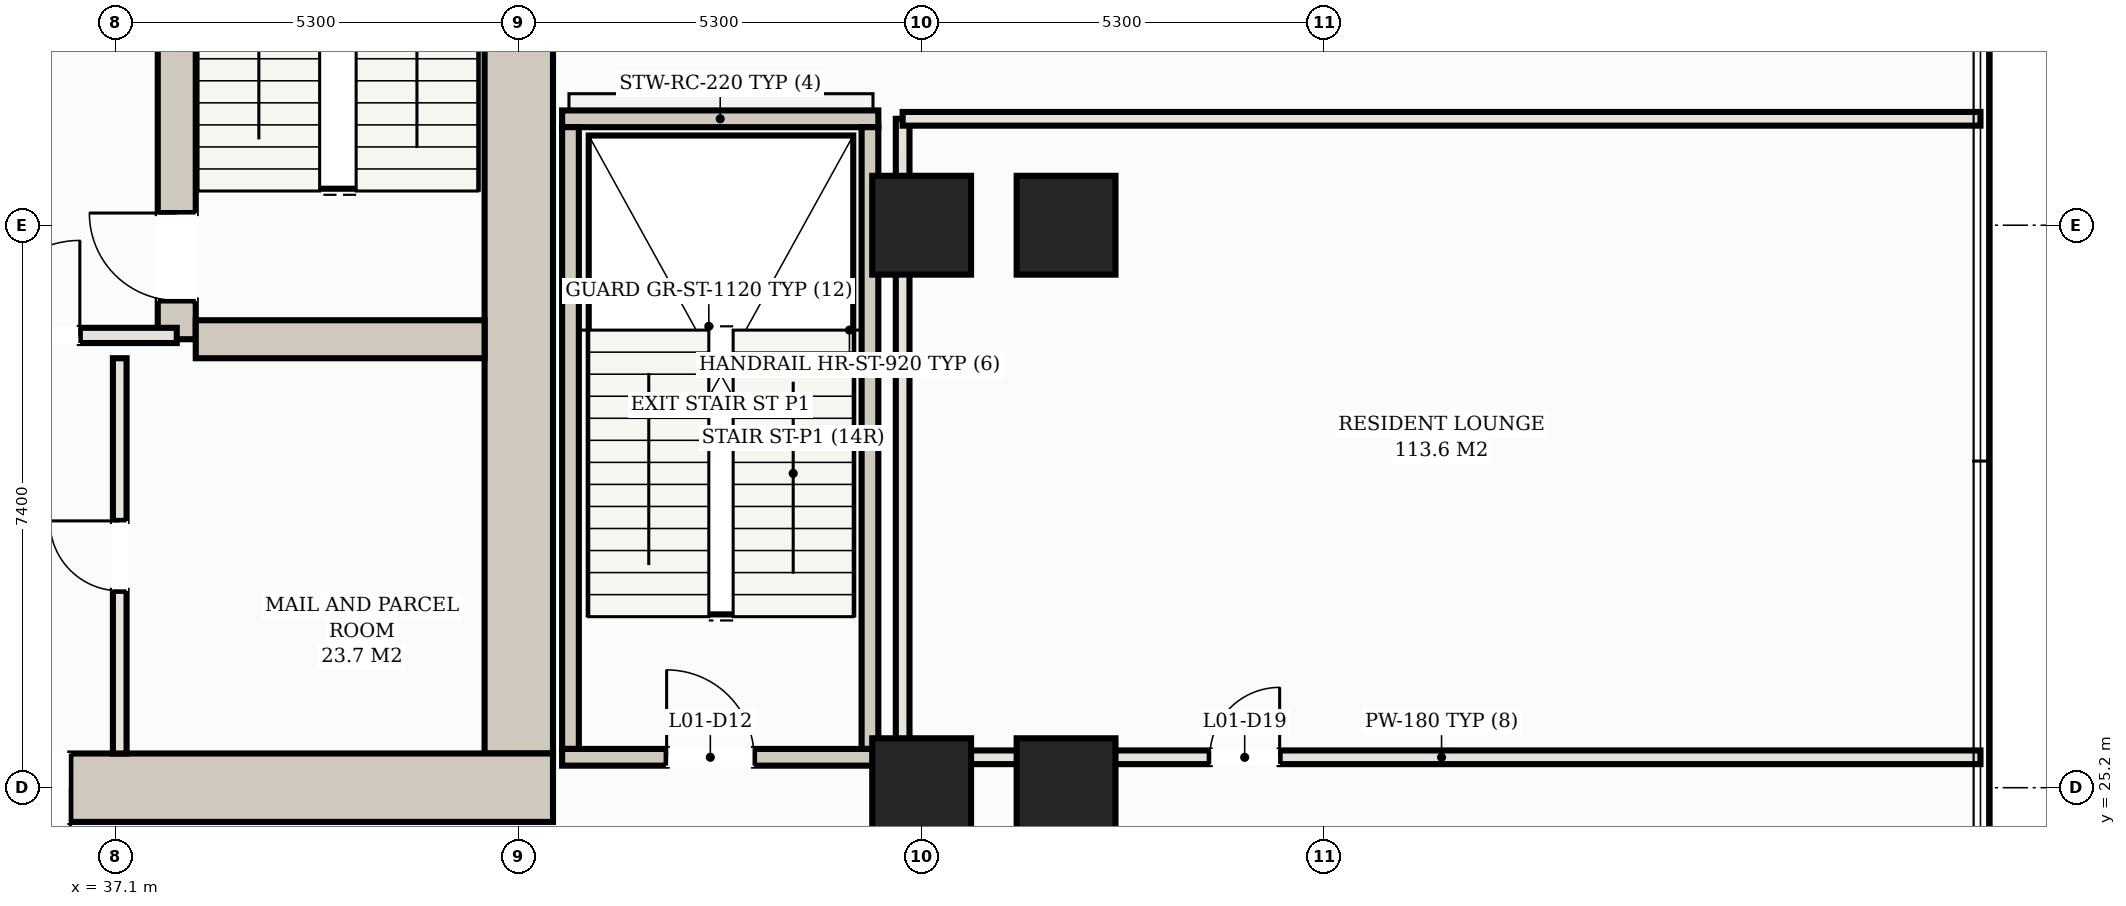
"""IFC4 building model, lengths in metres.
Left out: names, types, materials, properties, quantities, classifications, styles, units other than length and angle.
Written with IfcOpenShell. Run it as: python <this file> out.ifc"""

import sys

from ifc_helpers import new_model, si_unit, direction, frame, frame_2d, origin, origin_2d, place, context, subcontext, project, spatial, rectangle, hollow_rectangle, extrude, element, fill, save


model = new_model("IFC4")
c1 = context("Model", 3, precision=1e-05, world=origin(), true_north=direction((0.0, 1.0)))
c2 = subcontext(c1, "Body", "Model", "MODEL_VIEW")
j1 = project(units=[si_unit("LENGTHUNIT", "METRE"), si_unit("PLANEANGLEUNIT", "RADIAN")], contexts=[c1])
p1 = place(None, origin())
s1 = spatial("IfcSite", under=j1, at=p1, CompositionType="ELEMENT")
p2 = place(p1, origin())
s2 = spatial("IfcBuilding", under=s1, at=p2, CompositionType="ELEMENT")
p3 = place(p2, frame((0.0, 0.0, 5.2)))
s3 = spatial("IfcBuildingStorey", under=s2, at=p3, CompositionType="ELEMENT", Elevation=5.2)
p4 = place(p3, frame((42.4, 25.65, 0.0), z_axis=(0.0, 0.0, 1.0), x_axis=(0.0, 1.0, 0.0)))
e1 = element("IfcWall", 1, at=p4, inside=s3, PredefinedType="SHEAR", context=c2, shape_type="SweptSolid", body=[
    extrude(rectangle(XDim=13.9, YDim=0.9, at=frame_2d((6.95, 0.0))), origin(), (0.0, 0.0, 1.0), 4.35),
])
p5 = place(p3, frame((34.6, 25.2, 0.0), z_axis=(0.0, 0.0, 1.0), x_axis=(1.0, 0.0, 0.0)))
e2 = element("IfcWall", 2, at=p5, inside=s3, PredefinedType="SHEAR", context=c2, shape_type="SweptSolid", body=[
    extrude(rectangle(XDim=8.25, YDim=0.9, at=frame_2d((4.125, 0.0))), origin(), (0.0, 0.0, 1.0), 4.35),
])
p6 = place(p5, frame((0.65, 0.0, 0.0)))
e3 = element("IfcOpeningElement", 3, at=p6, cuts=e2, PredefinedType="OPENING", context=c2, shape_type="SweptSolid", body=[
    extrude(rectangle(XDim=1.25, YDim=2.2, at=frame_2d((0.625, 1.1))), frame((0.0, 0.46, 0.0), z_axis=(0.0, -1.0, 0.0), x_axis=(1.0, 0.0, 0.0)), (0.0, 0.0, 1.0), 0.92),
])
p7 = place(p3, frame((37.9, 31.1, 0.0), z_axis=(0.0, 0.0, 1.0), x_axis=(0.0, 1.0, 0.0)))
e4 = element("IfcWall", 4, at=p7, inside=s3, PredefinedType="SHEAR", context=c2, shape_type="SweptSolid", body=[
    extrude(rectangle(XDim=8.45, YDim=0.5, at=frame_2d((4.225, 0.0))), origin(), (0.0, 0.0, 1.0), 4.35),
])
p8 = place(p7, frame((0.51, 0.0, 0.0)))
e5 = element("IfcOpeningElement", 5, at=p8, cuts=e4, PredefinedType="OPENING", context=c2, shape_type="SweptSolid", body=[
    extrude(rectangle(XDim=1.15, YDim=2.2, at=frame_2d((0.575, 1.1))), frame((0.0, 0.26, 0.0), z_axis=(0.0, -1.0, 0.0), x_axis=(1.0, 0.0, 0.0)), (0.0, 0.0, 1.0), 0.52),
])
p9 = place(p3, frame((38.15, 31.1, 0.0), z_axis=(0.0, 0.0, 1.0), x_axis=(1.0, 0.0, 0.0)))
e6 = element("IfcWall", 6, at=p9, inside=s3, PredefinedType="SHEAR", context=c2, shape_type="SweptSolid", body=[
    extrude(rectangle(XDim=3.8, YDim=0.5, at=frame_2d((1.9, 0.0))), origin(), (0.0, 0.0, 1.0), 4.35),
])
for number, where, z_axis, x_axis in (
    (7, (47.7, 25.2, 0.0), (0.0, 0.0, 1.0), (1.0, 0.0, 0.0)),
    (8, (47.7, 32.6, 0.0), (0.0, 0.0, 1.0), (1.0, 0.0, 0.0)),
    (9, (49.6, 25.2, 0.0), (0.0, 0.0, 1.0), (1.0, 0.0, 0.0)),
    (10, (49.6, 32.6, 0.0), (0.0, 0.0, 1.0), (1.0, 0.0, 0.0)),
):
    element("IfcColumn", number, at=place(p3, frame(where, z_axis=z_axis, x_axis=x_axis)), inside=s3, PredefinedType="COLUMN", context=c2, shape_type="SweptSolid", body=[
        extrude(hollow_rectangle(XDim=1.3, YDim=1.3, WallThickness=0.042, at=origin_2d()), origin(), (0.0, 0.0, 1.0), 4.6),
    ])
p10 = place(p3, frame((42.97, 34.0, 0.0), z_axis=(0.0, 0.0, 1.0), x_axis=(1.0, 0.0, 0.0)))
e11 = element("IfcWall", 11, at=p10, inside=s3, PredefinedType="SHEAR", context=c2, shape_type="SweptSolid", body=[
    extrude(rectangle(XDim=4.16, YDim=0.22, at=frame_2d((2.08, 0.0))), origin(), (0.0, 0.0, 1.0), 4.35),
])
for number, where, z_axis, x_axis in (
    (12, (43.08, 25.71, 0.0), (0.0, 0.0, 1.0), (0.0, 1.0, 0.0)),
    (13, (47.02, 25.71, 0.0), (0.0, 0.0, 1.0), (0.0, 1.0, 0.0)),
):
    element("IfcWall", number, at=place(p3, frame(where, z_axis=z_axis, x_axis=x_axis)), inside=s3, PredefinedType="SHEAR", context=c2, shape_type="SweptSolid", body=[
        extrude(rectangle(XDim=8.18, YDim=0.22, at=frame_2d((4.09, 0.0))), origin(), (0.0, 0.0, 1.0), 4.35),
    ])
p11 = place(p3, frame((42.97, 25.6, 0.0), z_axis=(0.0, 0.0, 1.0), x_axis=(1.0, 0.0, 0.0)))
e14 = element("IfcWall", 14, at=p11, inside=s3, PredefinedType="SHEAR", context=c2, shape_type="SweptSolid", body=[
    extrude(rectangle(XDim=4.16, YDim=0.22, at=frame_2d((2.08, 0.0))), origin(), (0.0, 0.0, 1.0), 4.35),
])
p12 = place(p11, frame((1.375, 0.0, 0.0)))
e15 = element("IfcOpeningElement", 15, at=p12, cuts=e14, PredefinedType="OPENING", context=c2, shape_type="SweptSolid", body=[
    extrude(rectangle(XDim=1.15, YDim=2.2, at=frame_2d((0.575, 1.1))), frame((0.0, 0.12, 0.0), z_axis=(0.0, -1.0, 0.0), x_axis=(1.0, 0.0, 0.0)), (0.0, 0.0, 1.0), 0.24),
])
p13 = place(p3, frame((34.65, 31.15, 0.0), z_axis=(0.0, 0.0, 1.0), x_axis=(1.0, 0.0, 0.0)))
e16 = element("IfcWall", 16, at=p13, inside=s3, PredefinedType="PARTITIONING", context=c2, shape_type="SweptSolid", body=[
    extrude(rectangle(XDim=3.25, YDim=0.2, at=frame_2d((1.625, 0.0))), origin(), (0.0, 0.0, 1.0), 4.35),
])
p14 = place(p13, frame((0.725, 0.0, 0.0)))
e17 = element("IfcOpeningElement", 17, at=p14, cuts=e16, PredefinedType="OPENING", context=c2, shape_type="SweptSolid", body=[
    extrude(rectangle(XDim=1.25, YDim=2.2, at=frame_2d((0.625, 1.1))), frame((0.0, 0.11, 0.0), z_axis=(0.0, -1.0, 0.0), x_axis=(1.0, 0.0, 0.0)), (0.0, 0.0, 1.0), 0.22),
])
p15 = place(p3, frame((37.15, 25.65, 0.0), z_axis=(0.0, 0.0, 1.0), x_axis=(0.0, 1.0, 0.0)))
e18 = element("IfcWall", 18, at=p15, inside=s3, PredefinedType="PARTITIONING", context=c2, shape_type="SweptSolid", body=[
    extrude(rectangle(XDim=5.2, YDim=0.18, at=frame_2d((2.6, 0.0))), origin(), (0.0, 0.0, 1.0), 4.35),
])
p16 = place(p15, frame((2.14, 0.0, 0.0)))
e19 = element("IfcOpeningElement", 19, at=p16, cuts=e18, PredefinedType="OPENING", context=c2, shape_type="SweptSolid", body=[
    extrude(rectangle(XDim=0.92, YDim=2.15, at=frame_2d((0.46, 1.075))), frame((0.0, 0.1, 0.0), z_axis=(0.0, -1.0, 0.0), x_axis=(1.0, 0.0, 0.0)), (0.0, 0.0, 1.0), 0.2),
])
p17 = place(p3, frame((47.45, 25.6, 0.0), z_axis=(0.0, 0.0, 1.0), x_axis=(0.0, 1.0, 0.0)))
e20 = element("IfcWall", 20, at=p17, inside=s3, PredefinedType="PARTITIONING", context=c2, shape_type="SweptSolid", body=[
    extrude(rectangle(XDim=8.4, YDim=0.18, at=frame_2d((4.2, 0.0))), origin(), (0.0, 0.0, 1.0), 3.495),
])
p18 = place(p3, frame((47.45, 25.6, 0.0), z_axis=(0.0, 0.0, 1.0), x_axis=(1.0, 0.0, 0.0)))
e21 = element("IfcWall", 21, at=p18, inside=s3, PredefinedType="PARTITIONING", context=c2, shape_type="SweptSolid", body=[
    extrude(rectangle(XDim=14.18, YDim=0.18, at=frame_2d((7.09, 0.0))), origin(), (0.0, 0.0, 1.0), 4.35),
])
p19 = place(p18, frame((4.04, 0.0, 0.0)))
e22 = element("IfcOpeningElement", 22, at=p19, cuts=e21, PredefinedType="OPENING", context=c2, shape_type="SweptSolid", body=[
    extrude(rectangle(XDim=0.92, YDim=2.15, at=frame_2d((0.46, 1.075))), frame((0.0, 0.1, 0.0), z_axis=(0.0, -1.0, 0.0), x_axis=(1.0, 0.0, 0.0)), (0.0, 0.0, 1.0), 0.2),
])
p20 = place(p3, frame((47.45, 34.0, 0.0), z_axis=(0.0, 0.0, 1.0), x_axis=(1.0, 0.0, 0.0)))
e23 = element("IfcWall", 23, at=p20, inside=s3, PredefinedType="PARTITIONING", context=c2, shape_type="SweptSolid", body=[
    extrude(rectangle(XDim=14.18, YDim=0.18, at=frame_2d((7.09, 0.0))), origin(), (0.0, 0.0, 1.0), 4.35),
])
p21 = place(p6, frame((1.25, 0.0, 0.0), z_axis=(0.0, 0.0, 1.0), x_axis=(-1.0, 0.0, 0.0)))
e24 = element("IfcDoor", 24, at=p21, inside=s3, OperationType="SINGLE_SWING_LEFT", PredefinedType="DOOR", context=c2, shape_type="SweptSolid", body=[
    extrude(rectangle(XDim=1.25, YDim=2.2, at=frame_2d((0.625, 1.1))), frame((0.0, 0.025, 0.0), z_axis=(0.0, -1.0, 0.0), x_axis=(1.0, 0.0, 0.0)), (0.0, 0.0, 1.0), 0.05),
])
fill(e3, e24)
p22 = place(p14, origin())
e25 = element("IfcDoor", 25, at=p22, inside=s3, OperationType="SINGLE_SWING_RIGHT", PredefinedType="DOOR", context=c2, shape_type="SweptSolid", body=[
    extrude(rectangle(XDim=1.25, YDim=2.2, at=frame_2d((0.625, 1.1))), frame((0.0, 0.025, 0.0), z_axis=(0.0, -1.0, 0.0), x_axis=(1.0, 0.0, 0.0)), (0.0, 0.0, 1.0), 0.05),
])
fill(e17, e25)
p23 = place(p8, origin())
e26 = element("IfcDoor", 26, at=p23, inside=s3, OperationType="SINGLE_SWING_RIGHT", PredefinedType="DOOR", context=c2, shape_type="SweptSolid", body=[
    extrude(rectangle(XDim=1.15, YDim=2.2, at=frame_2d((0.575, 1.1))), frame((0.0, 0.025, 0.0), z_axis=(0.0, -1.0, 0.0), x_axis=(1.0, 0.0, 0.0)), (0.0, 0.0, 1.0), 0.05),
])
fill(e5, e26)
p24 = place(p16, origin())
e27 = element("IfcDoor", 27, at=p24, inside=s3, OperationType="SINGLE_SWING_RIGHT", PredefinedType="DOOR", context=c2, shape_type="SweptSolid", body=[
    extrude(rectangle(XDim=0.92, YDim=2.15, at=frame_2d((0.46, 1.075))), frame((0.0, 0.025, 0.0), z_axis=(0.0, -1.0, 0.0), x_axis=(1.0, 0.0, 0.0)), (0.0, 0.0, 1.0), 0.05),
])
fill(e19, e27)
p25 = place(p12, origin())
e28 = element("IfcDoor", 28, at=p25, inside=s3, OperationType="SINGLE_SWING_LEFT", PredefinedType="DOOR", context=c2, shape_type="SweptSolid", body=[
    extrude(rectangle(XDim=1.15, YDim=2.2, at=frame_2d((0.575, 1.1))), frame((0.0, 0.025, 0.0), z_axis=(0.0, -1.0, 0.0), x_axis=(1.0, 0.0, 0.0)), (0.0, 0.0, 1.0), 0.05),
])
fill(e15, e28)
p26 = place(p19, origin())
e29 = element("IfcDoor", 29, at=p26, inside=s3, OperationType="SINGLE_SWING_RIGHT", PredefinedType="DOOR", context=c2, shape_type="SweptSolid", body=[
    extrude(rectangle(XDim=0.92, YDim=2.15, at=frame_2d((0.46, 1.075))), frame((0.0, 0.025, 0.0), z_axis=(0.0, -1.0, 0.0), x_axis=(1.0, 0.0, 0.0)), (0.0, 0.0, 1.0), 0.05),
])
fill(e22, e29)
save(model, sys.argv[1])
